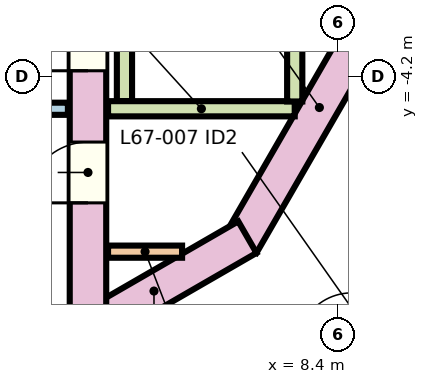
"""IFC4 building model, lengths in metres.
Left out: names, types, materials, properties, quantities, classifications, styles, units other than length and angle.
Written with IfcOpenShell. Run it as: python <this file> out.ifc"""

import sys

from ifc_helpers import new_model, si_unit, direction, frame, frame_2d, origin, place, context, subcontext, project, spatial, rectangle, extrude, element, fill, save


model = new_model("IFC4")
c1 = context("Model", 3, precision=1e-05, world=origin(), true_north=direction((0.0, 1.0)))
c2 = subcontext(c1, "Body", "Model", "MODEL_VIEW")
j1 = project(units=[si_unit("LENGTHUNIT", "METRE"), si_unit("PLANEANGLEUNIT", "RADIAN")], contexts=[c1])
p1 = place(None, origin())
s1 = spatial("IfcSite", under=j1, at=p1, CompositionType="ELEMENT")
p2 = place(p1, origin())
s2 = spatial("IfcBuilding", under=s1, at=p2, CompositionType="ELEMENT")
p3 = place(p2, frame((0.0, 0.0, 306.1)))
s3 = spatial("IfcBuildingStorey", under=s2, at=p3, CompositionType="ELEMENT", Elevation=306.1)
p4 = place(p3, frame((9.399, -2.438, 0.0), z_axis=(0.0, 0.0, 1.0), x_axis=(-0.499989188378, -0.866031645787, 0.0)))
e1 = element("IfcWall", 1, at=p4, inside=s3, PredefinedType="SHEAR", context=c2, shape_type="SweptSolid", body=[
    extrude(rectangle(XDim=5.176, YDim=0.6, at=frame_2d((2.588, 0.0))), origin(), (0.0, 0.0, 1.0), 3.6),
])
p5 = place(p3, frame((6.921, -6.811, 0.0), z_axis=(0.0, 0.0, 1.0), x_axis=(-0.866039982607, -0.499974747889, 0.0)))
e2 = element("IfcWall", 2, at=p5, inside=s3, PredefinedType="SHEAR", context=c2, shape_type="SweptSolid", body=[
    extrude(rectangle(XDim=3.546, YDim=0.6, at=frame_2d((1.773, 0.0))), origin(), (0.0, 0.0, 1.0), 3.6),
])
p6 = place(p3, frame((4.3, -8.844, 0.0), z_axis=(0.0, 0.0, 1.0), x_axis=(0.0, 1.0, 0.0)))
e3 = element("IfcWall", 3, at=p6, inside=s3, PredefinedType="SHEAR", context=c2, shape_type="SweptSolid", body=[
    extrude(rectangle(XDim=17.688, YDim=0.6, at=frame_2d((8.844, 0.0))), origin(), (0.0, 0.0, 1.0), 3.6),
])
p7 = place(p6, frame((4.769, 0.0, 0.0)))
e4 = element("IfcOpeningElement", 4, at=p7, cuts=e3, PredefinedType="OPENING", context=c2, shape_type="SweptSolid", body=[
    extrude(rectangle(XDim=1.1, YDim=2.1, at=frame_2d((0.55, 1.05))), frame((0.0, 0.31, 0.0), z_axis=(0.0, -1.0, 0.0), x_axis=(1.0, 0.0, 0.0)), (0.0, 0.0, 1.0), 0.62),
])
p8 = place(p6, frame((7.119, 0.0, 0.0)))
e5 = element("IfcOpeningElement", 5, at=p8, cuts=e3, PredefinedType="OPENING", context=c2, shape_type="SweptSolid", body=[
    extrude(rectangle(XDim=1.1, YDim=2.1, at=frame_2d((0.55, 1.05))), frame((0.0, 0.31, 0.0), z_axis=(0.0, -1.0, 0.0), x_axis=(1.0, 0.0, 0.0)), (0.0, 0.0, 1.0), 0.62),
])
p9 = place(p6, frame((2.597, 0.0, 0.0)))
e6 = element("IfcOpeningElement", 6, at=p9, cuts=e3, PredefinedType="OPENING", context=c2, shape_type="SweptSolid", body=[
    extrude(rectangle(XDim=1.0, YDim=2.1, at=frame_2d((0.5, 1.05))), frame((0.0, 0.31, 0.0), z_axis=(0.0, -1.0, 0.0), x_axis=(1.0, 0.0, 0.0)), (0.0, 0.0, 1.0), 0.62),
])
p10 = place(p6, frame((11.649, 0.0, 0.0)))
e7 = element("IfcOpeningElement", 7, at=p10, cuts=e3, PredefinedType="OPENING", context=c2, shape_type="SweptSolid", body=[
    extrude(rectangle(XDim=1.0, YDim=2.1, at=frame_2d((0.5, 1.05))), frame((0.0, 0.31, 0.0), z_axis=(0.0, -1.0, 0.0), x_axis=(1.0, 0.0, 0.0)), (0.0, 0.0, 1.0), 0.62),
])
p11 = place(p3, frame((3.97, -4.7, 0.0), z_axis=(0.0, 0.0, 1.0), x_axis=(-1.0, 0.0, 0.0)))
e8 = element("IfcWall", 8, at=p11, inside=s3, PredefinedType="SOLIDWALL", context=c2, shape_type="SweptSolid", body=[
    extrude(rectangle(XDim=3.17, YDim=0.2, at=frame_2d((1.585, 0.0))), origin(), (0.0, 0.0, 1.0), 3.35),
])
p12 = place(p3, frame((4.9, -0.125, 0.0), z_axis=(0.0, 0.0, 1.0), x_axis=(0.0, -1.0, 0.0)))
e9 = element("IfcWall", 9, at=p12, inside=s3, PredefinedType="SOLIDWALL", context=c2, shape_type="SweptSolid", body=[
    extrude(rectangle(XDim=4.45, YDim=0.25, at=frame_2d((2.225, 0.0))), origin(), (0.0, 0.0, 1.0), 3.35),
])
p13 = place(p3, frame((5.839, -16.188, 0.0), z_axis=(0.0, 0.0, 1.0), x_axis=(0.347484524478, 0.937685717737, 0.0)))
e10 = element("IfcWall", 10, at=p13, inside=s3, PredefinedType="SOLIDWALL", context=c2, shape_type="SweptSolid", body=[
    extrude(rectangle(XDim=26.4, YDim=0.25, at=frame_2d((13.2, 0.0))), origin(), (0.0, 0.0, 1.0), 3.35),
])
p14 = place(p13, frame((8.062, 0.0, 0.0)))
e11 = element("IfcOpeningElement", 11, at=p14, cuts=e10, PredefinedType="OPENING", context=c2, shape_type="SweptSolid", body=[
    extrude(rectangle(XDim=0.9, YDim=2.1, at=frame_2d((0.45, 1.05))), frame((0.0, 0.135, 0.0), z_axis=(0.0, -1.0, 0.0), x_axis=(1.0, 0.0, 0.0)), (0.0, 0.0, 1.0), 0.27),
])
p15 = place(p13, frame((12.7, 0.0, 0.0)))
e12 = element("IfcOpeningElement", 12, at=p15, cuts=e10, PredefinedType="OPENING", context=c2, shape_type="SweptSolid", body=[
    extrude(rectangle(XDim=0.9, YDim=2.1, at=frame_2d((0.45, 1.05))), frame((0.0, 0.135, 0.0), z_axis=(0.0, -1.0, 0.0), x_axis=(1.0, 0.0, 0.0)), (0.0, 0.0, 1.0), 0.27),
])
p16 = place(p3, frame((5.848, -7.05, 0.0), z_axis=(0.0, 0.0, 1.0), x_axis=(-1.0, 0.0, 0.0)))
e13 = element("IfcWall", 13, at=p16, inside=s3, PredefinedType="PARTITIONING", context=c2, shape_type="SweptSolid", body=[
    extrude(rectangle(XDim=1.218, YDim=0.2, at=frame_2d((0.609, 0.0))), origin(), (0.0, 0.0, 1.0), 3.35),
])
p17 = place(p3, frame((6.595, -19.326, 0.0), z_axis=(0.0, 0.0, 1.0), x_axis=(0.347482068394, 0.937686627901, 0.0)))
e14 = element("IfcWall", 14, at=p17, inside=s3, PredefinedType="PARTITIONING", context=c2, shape_type="SweptSolid", body=[
    extrude(rectangle(XDim=23.61, YDim=0.2, at=frame_2d((11.805, 0.0))), origin(), (0.0, 0.0, 1.0), 3.35),
])
p18 = place(p17, frame((6.46, 0.0, 0.0)))
e15 = element("IfcOpeningElement", 15, at=p18, cuts=e14, PredefinedType="OPENING", context=c2, shape_type="SweptSolid", body=[
    extrude(rectangle(XDim=1.0, YDim=2.1, at=frame_2d((0.5, 1.05))), frame((0.0, 0.11, 0.0), z_axis=(0.0, -1.0, 0.0), x_axis=(1.0, 0.0, 0.0)), (0.0, 0.0, 1.0), 0.22),
])
p19 = place(p17, frame((21.165, 0.0, 0.0)))
e16 = element("IfcOpeningElement", 16, at=p19, cuts=e14, PredefinedType="OPENING", context=c2, shape_type="SweptSolid", body=[
    extrude(rectangle(XDim=1.0, YDim=2.1, at=frame_2d((0.5, 1.05))), frame((0.0, 0.11, 0.0), z_axis=(0.0, -1.0, 0.0), x_axis=(1.0, 0.0, 0.0)), (0.0, 0.0, 1.0), 0.22),
])
p20 = place(p17, frame((0.32, 0.0, 0.0)))
e17 = element("IfcOpeningElement", 17, at=p20, cuts=e14, PredefinedType="OPENING", context=c2, shape_type="SweptSolid", body=[
    extrude(rectangle(XDim=1.0, YDim=2.1, at=frame_2d((0.5, 1.05))), frame((0.0, 0.11, 0.0), z_axis=(0.0, -1.0, 0.0), x_axis=(1.0, 0.0, 0.0)), (0.0, 0.0, 1.0), 0.22),
])
p21 = place(p3, frame((7.7, -4.7, 0.0), z_axis=(0.0, 0.0, 1.0), x_axis=(-1.0, 0.0, 0.0)))
e18 = element("IfcWall", 18, at=p21, inside=s3, PredefinedType="SOLIDWALL", context=c2, shape_type="SweptSolid", body=[
    extrude(rectangle(XDim=3.07, YDim=0.25, at=frame_2d((1.535, 0.0))), origin(), (0.0, 0.0, 1.0), 3.35),
])
p22 = place(p3, frame((7.7, -4.58, 0.0), z_axis=(0.0, 0.0, 1.0), x_axis=(0.0, 1.0, 0.0)))
e19 = element("IfcWall", 19, at=p22, inside=s3, PredefinedType="SOLIDWALL", context=c2, shape_type="SweptSolid", body=[
    extrude(rectangle(XDim=9.302, YDim=0.25, at=frame_2d((4.651, 0.0))), origin(), (0.0, 0.0, 1.0), 3.35),
])
p23 = place(p22, frame((5.29, 0.0, 0.0)))
e20 = element("IfcOpeningElement", 20, at=p23, cuts=e19, PredefinedType="OPENING", context=c2, shape_type="SweptSolid", body=[
    extrude(rectangle(XDim=0.9, YDim=2.1, at=frame_2d((0.45, 1.05))), frame((0.0, 0.135, 0.0), z_axis=(0.0, -1.0, 0.0), x_axis=(1.0, 0.0, 0.0)), (0.0, 0.0, 1.0), 0.27),
])
p24 = place(p7, origin())
e21 = element("IfcDoor", 21, at=p24, inside=s3, OperationType="SLIDING_TO_LEFT", PredefinedType="DOOR", context=c2, shape_type="SweptSolid", body=[
    extrude(rectangle(XDim=1.1, YDim=2.1, at=frame_2d((0.55, 1.05))), frame((0.0, 0.025, 0.0), z_axis=(0.0, -1.0, 0.0), x_axis=(1.0, 0.0, 0.0)), (0.0, 0.0, 1.0), 0.05),
])
fill(e4, e21)
p25 = place(p9, origin())
e22 = element("IfcDoor", 22, at=p25, inside=s3, OperationType="NOTDEFINED", PredefinedType="DOOR", context=c2, shape_type="SweptSolid", body=[
    extrude(rectangle(XDim=1.0, YDim=2.1, at=frame_2d((0.5, 1.05))), frame((0.0, 0.025, 0.0), z_axis=(0.0, -1.0, 0.0), x_axis=(1.0, 0.0, 0.0)), (0.0, 0.0, 1.0), 0.05),
])
fill(e6, e22)
save(model, sys.argv[1])
